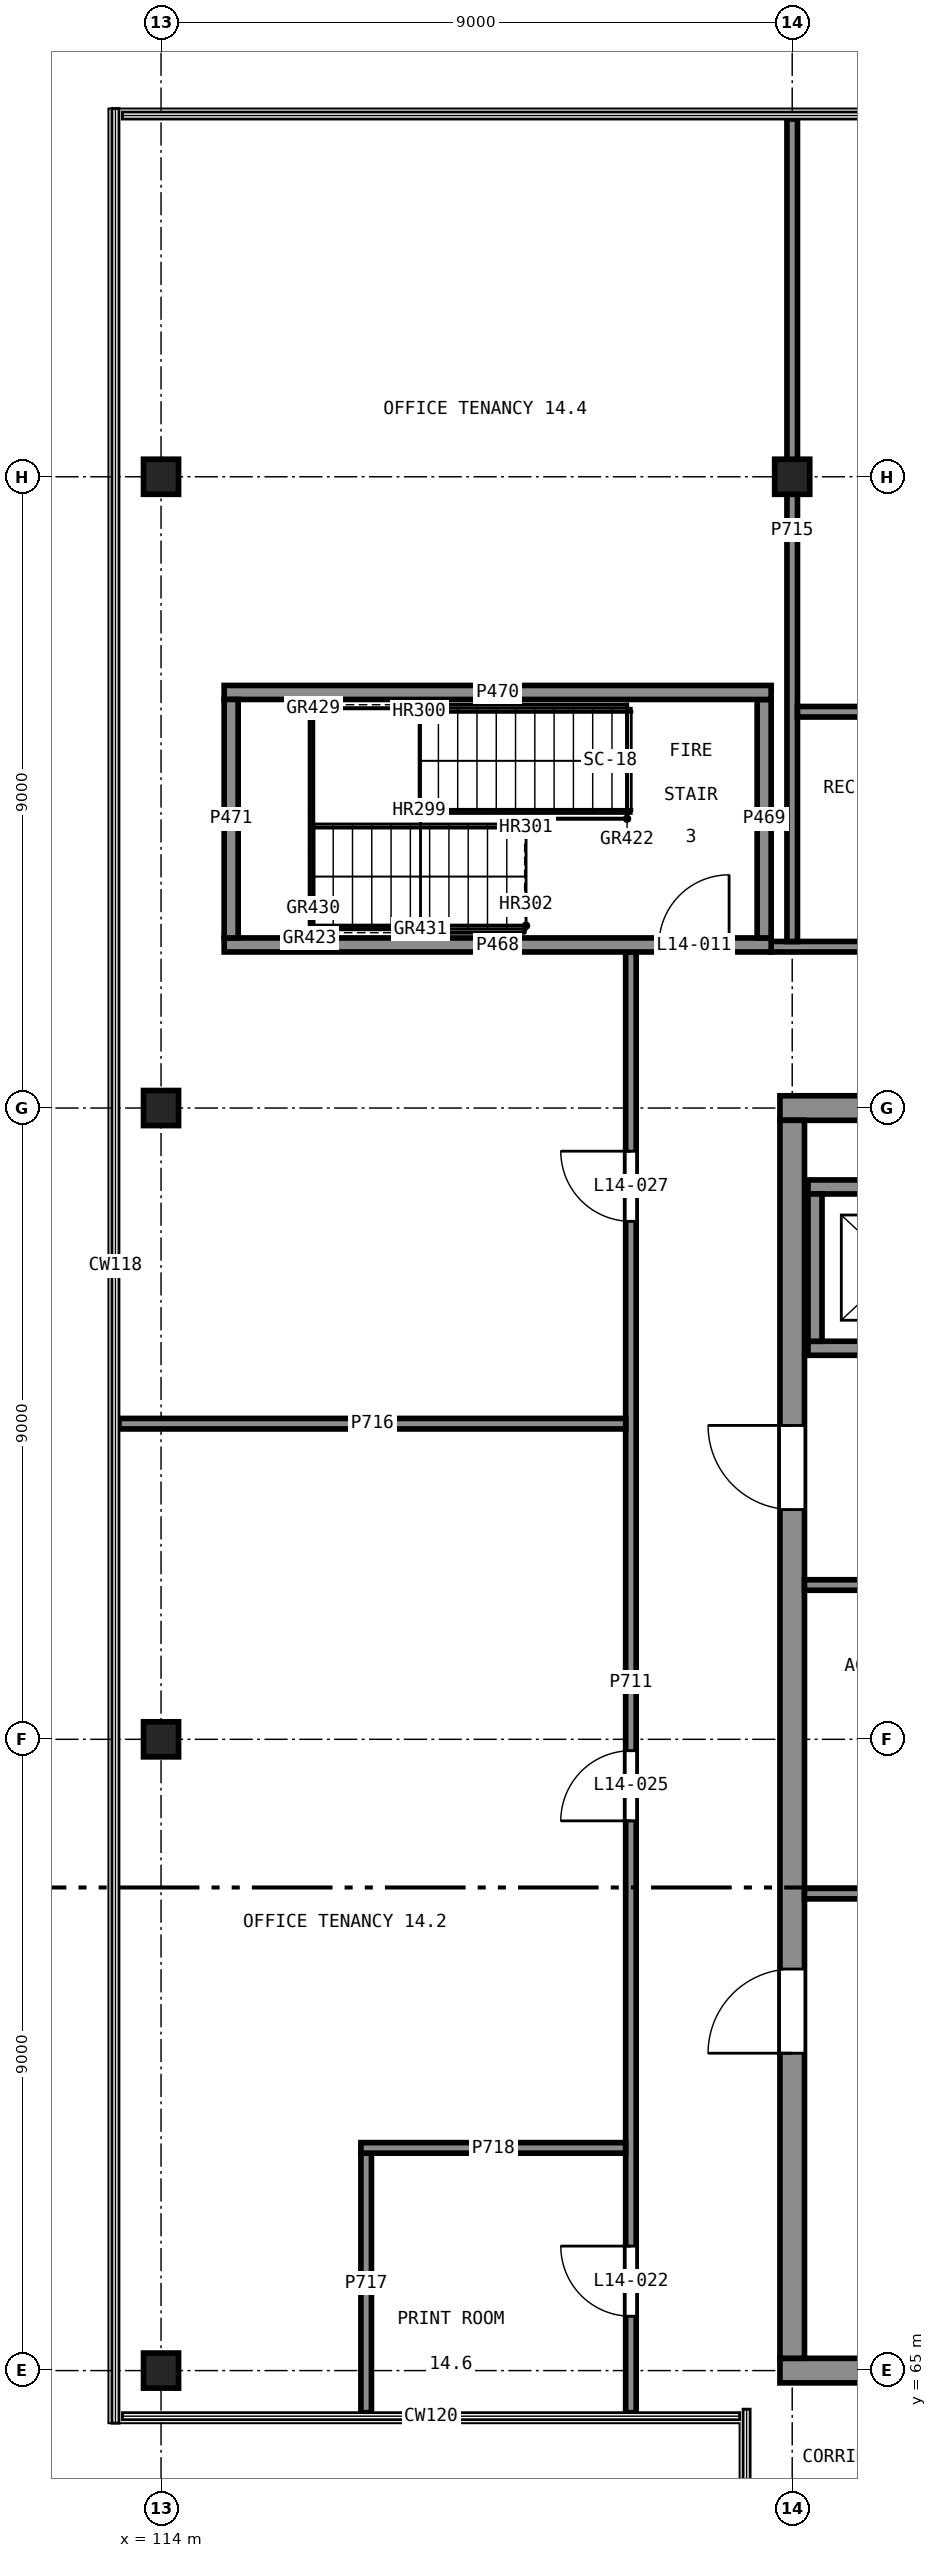
"""IFC4 building model, lengths in metres.
Left out: names, types, materials, properties, quantities, classifications, styles, units other than length and angle.
Written with IfcOpenShell. Run it as: python <this file> out.ifc"""

import sys

from ifc_helpers import new_model, si_unit, direction, frame, frame_2d, origin, origin_2d, place, context, subcontext, project, spatial, rectangle, extrude, element, fill, save


model = new_model("IFC4")
c1 = context("Model", 3, precision=1e-05, world=origin(), true_north=direction((0.0, 1.0)))
c2 = subcontext(c1, "Body", "Model", "MODEL_VIEW")
j1 = project(units=[si_unit("LENGTHUNIT", "METRE"), si_unit("PLANEANGLEUNIT", "RADIAN")], contexts=[c1])
p1 = place(None, origin())
s1 = spatial("IfcSite", under=j1, at=p1, CompositionType="ELEMENT")
p2 = place(p1, origin())
s2 = spatial("IfcBuilding", under=s1, at=p2, CompositionType="ELEMENT")
p3 = place(p2, frame((0.0, 0.0, 57.5)))
s3 = spatial("IfcBuildingStorey", under=s2, at=p3, CompositionType="ELEMENT", Elevation=57.5)
for number, where, z_axis, x_axis in (
    (1, (114.0, 65.0, 0.0), (0.0, 0.0, 1.0), (1.0, 0.0, 0.0)),
    (2, (114.0, 74.0, 0.0), (0.0, 0.0, 1.0), (1.0, 0.0, 0.0)),
    (3, (114.0, 83.0, 0.0), (0.0, 0.0, 1.0), (1.0, 0.0, 0.0)),
    (4, (114.0, 92.0, 0.0), (0.0, 0.0, 1.0), (1.0, 0.0, 0.0)),
    (5, (123.0, 92.0, 0.0), (0.0, 0.0, 1.0), (1.0, 0.0, 0.0)),
):
    element("IfcColumn", number, at=place(p3, frame(where, z_axis=z_axis, x_axis=x_axis)), inside=s3, PredefinedType="COLUMN", context=c2, shape_type="SweptSolid", body=[
        extrude(rectangle(XDim=0.5, YDim=0.5, at=origin_2d()), origin(), (0.0, 0.0, 1.0), 4.0),
    ])
for number, where, z_axis, x_axis in (
    (6, (122.825, 65.0, 0.0), (0.0, 0.0, 1.0), (1.0, 0.0, 0.0)),
    (7, (141.175, 83.0, 0.0), (0.0, 0.0, 1.0), (-1.0, 0.0, 0.0)),
):
    element("IfcWall", number, at=place(p3, frame(where, z_axis=z_axis, x_axis=x_axis)), inside=s3, PredefinedType="SHEAR", context=c2, shape_type="SweptSolid", body=[
        extrude(rectangle(XDim=18.35, YDim=0.35, at=frame_2d((9.175, 0.0))), origin(), (0.0, 0.0, 1.0), 4.0),
    ])
p4 = place(p3, frame((123.0, 82.825, 0.0), z_axis=(0.0, 0.0, 1.0), x_axis=(0.0, -1.0, 0.0)))
e8 = element("IfcWall", 8, at=p4, inside=s3, PredefinedType="SHEAR", context=c2, shape_type="SweptSolid", body=[
    extrude(rectangle(XDim=17.65, YDim=0.35, at=frame_2d((8.825, 0.0))), origin(), (0.0, 0.0, 1.0), 4.0),
])
p5 = place(p4, frame((12.1, 0.0, 0.0)))
e9 = element("IfcOpeningElement", 9, at=p5, cuts=e8, PredefinedType="OPENING", context=c2, shape_type="SweptSolid", body=[
    extrude(rectangle(XDim=1.2, YDim=2.1, at=frame_2d((0.6, 1.05))), frame((0.0, 0.185, 0.0), z_axis=(0.0, -1.0, 0.0), x_axis=(1.0, 0.0, 0.0)), (0.0, 0.0, 1.0), 0.37),
])
p6 = place(p4, frame((4.35, 0.0, 0.0)))
e10 = element("IfcOpeningElement", 10, at=p6, cuts=e8, PredefinedType="OPENING", context=c2, shape_type="SweptSolid", body=[
    extrude(rectangle(XDim=1.2, YDim=2.1, at=frame_2d((0.6, 1.05))), frame((0.0, 0.185, 0.0), z_axis=(0.0, -1.0, 0.0), x_axis=(1.0, 0.0, 0.0)), (0.0, 0.0, 1.0), 0.37),
])
p7 = place(p3, frame((123.225, 79.575, 0.0), z_axis=(0.0, 0.0, 1.0), x_axis=(1.0, 0.0, 0.0)))
e11 = element("IfcWall", 11, at=p7, inside=s3, PredefinedType="SHEAR", context=c2, shape_type="SweptSolid", body=[
    extrude(rectangle(XDim=2.55, YDim=0.2, at=frame_2d((1.275, 0.0))), origin(), (0.0, 0.0, 1.0), 4.0),
])
p8 = place(p7, frame((0.725, 0.0, 0.0)))
e12 = element("IfcOpeningElement", 12, at=p8, cuts=e11, PredefinedType="OPENING", context=c2, shape_type="SweptSolid", body=[
    extrude(rectangle(XDim=1.1, YDim=2.1, at=frame_2d((0.55, 1.05))), frame((0.0, 0.11, 0.0), z_axis=(0.0, -1.0, 0.0), x_axis=(1.0, 0.0, 0.0)), (0.0, 0.0, 1.0), 0.22),
])
p9 = place(p3, frame((125.775, 81.875, 0.0), z_axis=(0.0, 0.0, 1.0), x_axis=(-1.0, 0.0, 0.0)))
e13 = element("IfcWall", 13, at=p9, inside=s3, PredefinedType="SHEAR", context=c2, shape_type="SweptSolid", body=[
    extrude(rectangle(XDim=2.55, YDim=0.2, at=frame_2d((1.275, 0.0))), origin(), (0.0, 0.0, 1.0), 4.0),
])
p10 = place(p3, frame((123.325, 81.775, 0.0), z_axis=(0.0, 0.0, 1.0), x_axis=(0.0, -1.0, 0.0)))
e14 = element("IfcWall", 14, at=p10, inside=s3, PredefinedType="SHEAR", context=c2, shape_type="SweptSolid", body=[
    extrude(rectangle(XDim=2.1, YDim=0.2, at=frame_2d((1.05, 0.0))), origin(), (0.0, 0.0, 1.0), 4.0),
])
p11 = place(p3, frame((114.9, 85.325, 0.0), z_axis=(0.0, 0.0, 1.0), x_axis=(1.0, 0.0, 0.0)))
e15 = element("IfcWall", 15, at=p11, inside=s3, PredefinedType="SHEAR", context=c2, shape_type="SweptSolid", body=[
    extrude(rectangle(XDim=7.8, YDim=0.2, at=frame_2d((3.9, 0.0))), origin(), (0.0, 0.0, 1.0), 3.75),
])
p12 = place(p11, frame((6.2, 0.0, 0.0)))
e16 = element("IfcOpeningElement", 16, at=p12, cuts=e15, PredefinedType="OPENING", context=c2, shape_type="SweptSolid", body=[
    extrude(rectangle(XDim=1.0, YDim=2.1, at=frame_2d((0.5, 1.05))), frame((0.0, 0.11, 0.0), z_axis=(0.0, -1.0, 0.0), x_axis=(1.0, 0.0, 0.0)), (0.0, 0.0, 1.0), 0.22),
])
p13 = place(p3, frame((122.6, 85.425, 0.0), z_axis=(0.0, 0.0, 1.0), x_axis=(0.0, 1.0, 0.0)))
e17 = element("IfcWall", 17, at=p13, inside=s3, PredefinedType="SHEAR", context=c2, shape_type="SweptSolid", body=[
    extrude(rectangle(XDim=3.4, YDim=0.2, at=frame_2d((1.7, 0.0))), origin(), (0.0, 0.0, 1.0), 3.75),
])
p14 = place(p3, frame((122.7, 88.925, 0.0), z_axis=(0.0, 0.0, 1.0), x_axis=(-1.0, 0.0, 0.0)))
e18 = element("IfcWall", 18, at=p14, inside=s3, PredefinedType="SHEAR", context=c2, shape_type="SweptSolid", body=[
    extrude(rectangle(XDim=7.8, YDim=0.2, at=frame_2d((3.9, 0.0))), origin(), (0.0, 0.0, 1.0), 3.75),
])
p15 = place(p3, frame((115.0, 88.825, 0.0), z_axis=(0.0, 0.0, 1.0), x_axis=(0.0, -1.0, 0.0)))
e19 = element("IfcWall", 19, at=p15, inside=s3, PredefinedType="SHEAR", context=c2, shape_type="SweptSolid", body=[
    extrude(rectangle(XDim=3.4, YDim=0.2, at=frame_2d((1.7, 0.0))), origin(), (0.0, 0.0, 1.0), 3.75),
])
p16 = place(p3, frame((123.175, 71.8, 0.0), z_axis=(0.0, 0.0, 1.0), x_axis=(1.0, 0.0, 0.0)))
e20 = element("IfcWall", 20, at=p16, inside=s3, PredefinedType="PARTITIONING", context=c2, shape_type="SweptSolid", body=[
    extrude(rectangle(XDim=2.575, YDim=0.15, at=frame_2d((1.288, 0.0))), origin(), (0.0, 0.0, 1.0), 3.75),
])
p17 = place(p16, frame((0.85, 0.0, 0.0)))
e21 = element("IfcOpeningElement", 21, at=p17, cuts=e20, PredefinedType="OPENING", context=c2, shape_type="SweptSolid", body=[
    extrude(rectangle(XDim=1.0, YDim=2.1, at=frame_2d((0.5, 1.05))), frame((0.0, 0.085, 0.0), z_axis=(0.0, -1.0, 0.0), x_axis=(1.0, 0.0, 0.0)), (0.0, 0.0, 1.0), 0.17),
])
p18 = place(p3, frame((123.175, 76.2, 0.0), z_axis=(0.0, 0.0, 1.0), x_axis=(1.0, 0.0, 0.0)))
e22 = element("IfcWall", 22, at=p18, inside=s3, PredefinedType="PARTITIONING", context=c2, shape_type="SweptSolid", body=[
    extrude(rectangle(XDim=2.575, YDim=0.15, at=frame_2d((1.288, 0.0))), origin(), (0.0, 0.0, 1.0), 3.75),
])
p19 = place(p3, frame((120.7, 64.4, 0.0), z_axis=(0.0, 0.0, 1.0), x_axis=(0.0, 1.0, 0.0)))
e23 = element("IfcWall", 23, at=p19, inside=s3, PredefinedType="PARTITIONING", context=c2, shape_type="SweptSolid", body=[
    extrude(rectangle(XDim=20.825, YDim=0.15, at=frame_2d((10.413, 0.0))), origin(), (0.0, 0.0, 1.0), 3.75),
])
p20 = place(p19, frame((1.375, 0.0, 0.0)))
e24 = element("IfcOpeningElement", 24, at=p20, cuts=e23, PredefinedType="OPENING", context=c2, shape_type="SweptSolid", body=[
    extrude(rectangle(XDim=1.0, YDim=2.1, at=frame_2d((0.5, 1.05))), frame((0.0, 0.085, 0.0), z_axis=(0.0, -1.0, 0.0), x_axis=(1.0, 0.0, 0.0)), (0.0, 0.0, 1.0), 0.17),
])
p21 = place(p19, frame((8.438, 0.0, 0.0)))
e25 = element("IfcOpeningElement", 25, at=p21, cuts=e23, PredefinedType="OPENING", context=c2, shape_type="SweptSolid", body=[
    extrude(rectangle(XDim=1.0, YDim=2.1, at=frame_2d((0.5, 1.05))), frame((0.0, 0.085, 0.0), z_axis=(0.0, -1.0, 0.0), x_axis=(1.0, 0.0, 0.0)), (0.0, 0.0, 1.0), 0.17),
])
p22 = place(p19, frame((16.985, 0.0, 0.0)))
e26 = element("IfcOpeningElement", 26, at=p22, cuts=e23, PredefinedType="OPENING", context=c2, shape_type="SweptSolid", body=[
    extrude(rectangle(XDim=1.0, YDim=2.1, at=frame_2d((0.5, 1.05))), frame((0.0, 0.085, 0.0), z_axis=(0.0, -1.0, 0.0), x_axis=(1.0, 0.0, 0.0)), (0.0, 0.0, 1.0), 0.17),
])
p23 = place(p3, frame((122.7, 85.3, 0.0), z_axis=(0.0, 0.0, 1.0), x_axis=(1.0, 0.0, 0.0)))
e27 = element("IfcWall", 27, at=p23, inside=s3, PredefinedType="PARTITIONING", context=c2, shape_type="SweptSolid", body=[
    extrude(rectangle(XDim=9.9, YDim=0.15, at=frame_2d((4.95, 0.0))), origin(), (0.0, 0.0, 1.0), 3.75),
])
p24 = place(p23, frame((1.875, 0.0, 0.0)))
e28 = element("IfcOpeningElement", 28, at=p24, cuts=e27, PredefinedType="OPENING", context=c2, shape_type="SweptSolid", body=[
    extrude(rectangle(XDim=1.0, YDim=2.1, at=frame_2d((0.5, 1.05))), frame((0.0, 0.085, 0.0), z_axis=(0.0, -1.0, 0.0), x_axis=(1.0, 0.0, 0.0)), (0.0, 0.0, 1.0), 0.17),
])
p25 = place(p23, frame((6.698, 0.0, 0.0)))
e29 = element("IfcOpeningElement", 29, at=p25, cuts=e27, PredefinedType="OPENING", context=c2, shape_type="SweptSolid", body=[
    extrude(rectangle(XDim=1.0, YDim=2.1, at=frame_2d((0.5, 1.05))), frame((0.0, 0.085, 0.0), z_axis=(0.0, -1.0, 0.0), x_axis=(1.0, 0.0, 0.0)), (0.0, 0.0, 1.0), 0.17),
])
p26 = place(p3, frame((123.0, 85.374, 0.0), z_axis=(0.0, 0.0, 1.0), x_axis=(0.0, 1.0, 0.0)))
e30 = element("IfcWall", 30, at=p26, inside=s3, PredefinedType="PARTITIONING", context=c2, shape_type="SweptSolid", body=[
    extrude(rectangle(XDim=11.726, YDim=0.15, at=frame_2d((5.863, 0.0))), origin(), (0.0, 0.0, 1.0), 2.85),
])
p27 = place(p3, frame((113.4, 78.5, 0.0), z_axis=(0.0, 0.0, 1.0), x_axis=(1.0, 0.0, 0.0)))
e31 = element("IfcWall", 31, at=p27, inside=s3, PredefinedType="PARTITIONING", context=c2, shape_type="SweptSolid", body=[
    extrude(rectangle(XDim=7.226, YDim=0.15, at=frame_2d((3.613, 0.0))), origin(), (0.0, 0.0, 1.0), 3.75),
])
p28 = place(p3, frame((116.925, 64.4, 0.0), z_axis=(0.0, 0.0, 1.0), x_axis=(0.0, 1.0, 0.0)))
e32 = element("IfcWall", 32, at=p28, inside=s3, PredefinedType="PARTITIONING", context=c2, shape_type="SweptSolid", body=[
    extrude(rectangle(XDim=3.7, YDim=0.15, at=frame_2d((1.85, 0.0))), origin(), (0.0, 0.0, 1.0), 3.75),
])
p29 = place(p3, frame((120.625, 68.175, 0.0), z_axis=(0.0, 0.0, 1.0), x_axis=(-1.0, 0.0, 0.0)))
e33 = element("IfcWall", 33, at=p29, inside=s3, PredefinedType="PARTITIONING", context=c2, shape_type="SweptSolid", body=[
    extrude(rectangle(XDim=3.775, YDim=0.15, at=frame_2d((1.887, 0.0))), origin(), (0.0, 0.0, 1.0), 3.75),
])
p30 = place(p3, frame((123.075, 88.65, 0.0), z_axis=(0.0, 0.0, 1.0), x_axis=(1.0, 0.0, 0.0)))
e34 = element("IfcWall", 34, at=p30, inside=s3, PredefinedType="PARTITIONING", context=c2, shape_type="SweptSolid", body=[
    extrude(rectangle(XDim=4.0, YDim=0.15, at=frame_2d((2.0, 0.0))), origin(), (0.0, 0.0, 1.0), 3.75),
])
p31 = place(p12, origin())
e35 = element("IfcDoor", 35, at=p31, inside=s3, OperationType="SINGLE_SWING_LEFT", PredefinedType="DOOR", context=c2, shape_type="SweptSolid", body=[
    extrude(rectangle(XDim=1.0, YDim=2.1, at=frame_2d((0.5, 1.05))), frame((0.0, 0.025, 0.0), z_axis=(0.0, -1.0, 0.0), x_axis=(1.0, 0.0, 0.0)), (0.0, 0.0, 1.0), 0.05),
])
fill(e16, e35)
p32 = place(p5, frame((1.2, 0.0, 0.0), z_axis=(0.0, 0.0, 1.0), x_axis=(-1.0, 0.0, 0.0)))
e36 = element("IfcDoor", 36, at=p32, inside=s3, OperationType="SINGLE_SWING_RIGHT", PredefinedType="DOOR", context=c2, shape_type="SweptSolid", body=[
    extrude(rectangle(XDim=1.2, YDim=2.1, at=frame_2d((0.6, 1.05))), frame((0.0, 0.025, 0.0), z_axis=(0.0, -1.0, 0.0), x_axis=(1.0, 0.0, 0.0)), (0.0, 0.0, 1.0), 0.05),
])
fill(e9, e36)
p33 = place(p6, frame((1.2, 0.0, 0.0), z_axis=(0.0, 0.0, 1.0), x_axis=(-1.0, 0.0, 0.0)))
e37 = element("IfcDoor", 37, at=p33, inside=s3, OperationType="SINGLE_SWING_LEFT", PredefinedType="DOOR", context=c2, shape_type="SweptSolid", body=[
    extrude(rectangle(XDim=1.2, YDim=2.1, at=frame_2d((0.6, 1.05))), frame((0.0, 0.025, 0.0), z_axis=(0.0, -1.0, 0.0), x_axis=(1.0, 0.0, 0.0)), (0.0, 0.0, 1.0), 0.05),
])
fill(e10, e37)
p34 = place(p20, origin())
e38 = element("IfcDoor", 38, at=p34, inside=s3, OperationType="SINGLE_SWING_LEFT", PredefinedType="DOOR", context=c2, shape_type="SweptSolid", body=[
    extrude(rectangle(XDim=1.0, YDim=2.1, at=frame_2d((0.5, 1.05))), frame((0.0, 0.025, 0.0), z_axis=(0.0, -1.0, 0.0), x_axis=(1.0, 0.0, 0.0)), (0.0, 0.0, 1.0), 0.05),
])
fill(e24, e38)
p35 = place(p21, origin())
e39 = element("IfcDoor", 39, at=p35, inside=s3, OperationType="SINGLE_SWING_RIGHT", PredefinedType="DOOR", context=c2, shape_type="SweptSolid", body=[
    extrude(rectangle(XDim=1.0, YDim=2.1, at=frame_2d((0.5, 1.05))), frame((0.0, 0.025, 0.0), z_axis=(0.0, -1.0, 0.0), x_axis=(1.0, 0.0, 0.0)), (0.0, 0.0, 1.0), 0.05),
])
fill(e25, e39)
p36 = place(p22, origin())
e40 = element("IfcDoor", 40, at=p36, inside=s3, OperationType="SINGLE_SWING_LEFT", PredefinedType="DOOR", context=c2, shape_type="SweptSolid", body=[
    extrude(rectangle(XDim=1.0, YDim=2.1, at=frame_2d((0.5, 1.05))), frame((0.0, 0.025, 0.0), z_axis=(0.0, -1.0, 0.0), x_axis=(1.0, 0.0, 0.0)), (0.0, 0.0, 1.0), 0.05),
])
fill(e26, e40)
save(model, sys.argv[1])
